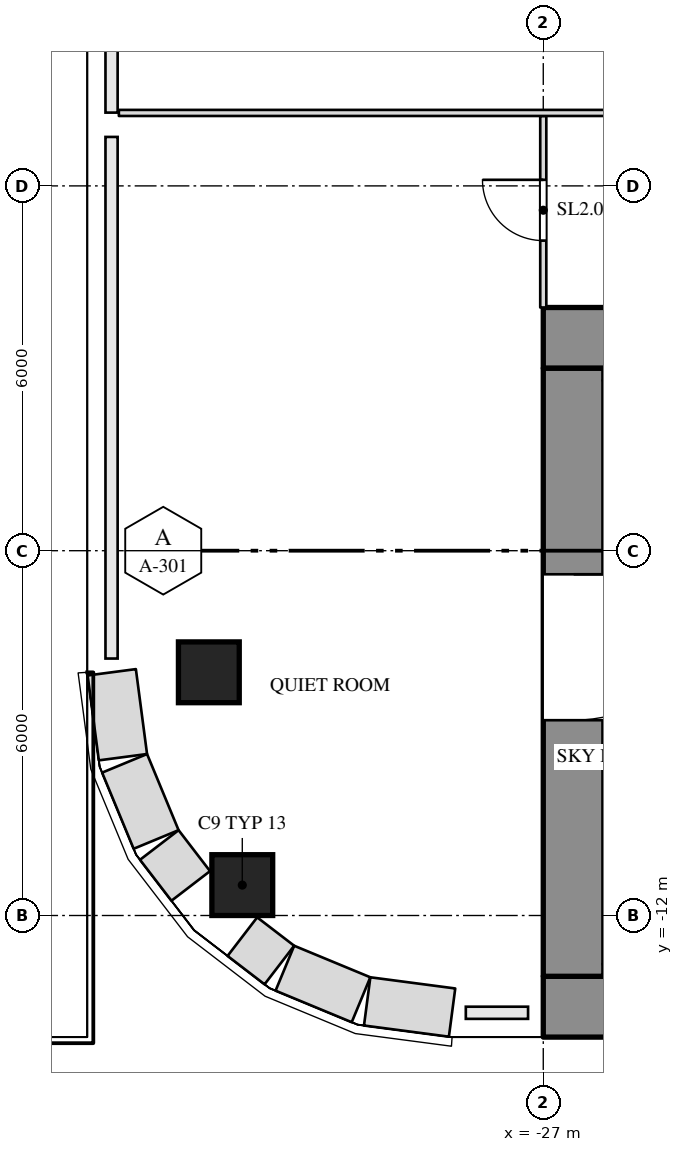
"""IFC4 building model, lengths in metres.
Left out: names, types, materials, properties, quantities, classifications, styles, units other than length and angle.
Written with IfcOpenShell. Run it as: python <this file> out.ifc"""

import sys

from ifc_helpers import new_model, si_unit, direction, frame, frame_2d, origin, origin_2d, place, context, subcontext, project, spatial, rectangle, extrude, element, fill, save


model = new_model("IFC4")
c1 = context("Model", 3, precision=1e-05, world=origin(), true_north=direction((0.0, 1.0)))
c2 = subcontext(c1, "Body", "Model", "MODEL_VIEW")
j1 = project(units=[si_unit("LENGTHUNIT", "METRE"), si_unit("PLANEANGLEUNIT", "RADIAN")], contexts=[c1])
p1 = place(None, origin())
s1 = spatial("IfcSite", under=j1, at=p1, CompositionType="ELEMENT")
p2 = place(p1, origin())
s2 = spatial("IfcBuilding", under=s1, at=p2, CompositionType="ELEMENT")
p3 = place(p2, frame((0.0, 0.0, 156.5)))
s3 = spatial("IfcBuildingStorey", under=s2, at=p3, CompositionType="ELEMENT", Elevation=156.5)
for number, where, z_axis, x_axis in (
    (1, (-31.95, -11.5, 0.0), (0.0, 0.0, 1.0), (1.0, 0.0, 0.0)),
    (2, (-32.5, -8.0, 0.0), (0.0, 0.0, 1.0), (1.0, 0.0, 0.0)),
):
    element("IfcColumn", number, at=place(p3, frame(where, z_axis=z_axis, x_axis=x_axis)), inside=s3, PredefinedType="COLUMN", context=c2, shape_type="SweptSolid", body=[
        extrude(rectangle(XDim=1.0, YDim=1.0, at=origin_2d()), origin(), (0.0, 0.0, 1.0), 4.0),
    ])
p4 = place(p3, frame((-27.0, -2.5, 0.0), z_axis=(0.0, 0.0, 1.0), x_axis=(1.0, 0.0, 0.0)))
e3 = element("IfcWall", 3, at=p4, inside=s3, PredefinedType="SHEAR", context=c2, shape_type="SweptSolid", body=[
    extrude(rectangle(XDim=54.0, YDim=1.0, at=frame_2d((27.0, 0.0))), origin(), (0.0, 0.0, 1.0), 3.65),
])
p5 = place(p4, frame((15.15, 0.0, 0.0)))
e4 = element("IfcOpeningElement", 4, at=p5, cuts=e3, PredefinedType="OPENING", context=c2, shape_type="SweptSolid", body=[
    extrude(rectangle(XDim=2.4, YDim=2.1, at=frame_2d((1.2, 1.05))), frame((0.0, 0.512, 0.0), z_axis=(0.0, -1.0, 0.0), x_axis=(1.0, 0.0, 0.0)), (0.0, 0.0, 1.0), 1.024),
])
p6 = place(p4, frame((36.45, 0.0, 0.0)))
e5 = element("IfcOpeningElement", 5, at=p6, cuts=e3, PredefinedType="OPENING", context=c2, shape_type="SweptSolid", body=[
    extrude(rectangle(XDim=2.4, YDim=2.1, at=frame_2d((1.2, 1.05))), frame((0.0, 0.512, 0.0), z_axis=(0.0, -1.0, 0.0), x_axis=(1.0, 0.0, 0.0)), (0.0, 0.0, 1.0), 1.024),
])
p7 = place(p3, frame((-27.0, -13.5, 0.0), z_axis=(0.0, 0.0, 1.0), x_axis=(1.0, 0.0, 0.0)))
e6 = element("IfcWall", 6, at=p7, inside=s3, PredefinedType="SHEAR", context=c2, shape_type="SweptSolid", body=[
    extrude(rectangle(XDim=54.0, YDim=1.0, at=frame_2d((27.0, 0.0))), origin(), (0.0, 0.0, 1.0), 3.65),
])
p8 = place(p7, frame((16.45, 0.0, 0.0)))
e7 = element("IfcOpeningElement", 7, at=p8, cuts=e6, PredefinedType="OPENING", context=c2, shape_type="SweptSolid", body=[
    extrude(rectangle(XDim=1.0, YDim=2.1, at=frame_2d((0.5, 1.05))), frame((0.0, 0.512, 0.0), z_axis=(0.0, -1.0, 0.0), x_axis=(1.0, 0.0, 0.0)), (0.0, 0.0, 1.0), 1.024),
])
p9 = place(p7, frame((36.55, 0.0, 0.0)))
e8 = element("IfcOpeningElement", 8, at=p9, cuts=e6, PredefinedType="OPENING", context=c2, shape_type="SweptSolid", body=[
    extrude(rectangle(XDim=1.0, YDim=2.1, at=frame_2d((0.5, 1.05))), frame((0.0, 0.512, 0.0), z_axis=(0.0, -1.0, 0.0), x_axis=(1.0, 0.0, 0.0)), (0.0, 0.0, 1.0), 1.024),
])
p10 = place(p3, frame((-26.5, -13.0, 0.0), z_axis=(0.0, 0.0, 1.0), x_axis=(0.0, 1.0, 0.0)))
e9 = element("IfcWall", 9, at=p10, inside=s3, PredefinedType="SHEAR", context=c2, shape_type="SweptSolid", body=[
    extrude(rectangle(XDim=10.0, YDim=1.0, at=frame_2d((5.0, 0.0))), origin(), (0.0, 0.0, 1.0), 3.65),
])
p11 = place(p10, frame((4.212, 0.0, 0.0)))
e10 = element("IfcOpeningElement", 10, at=p11, cuts=e9, PredefinedType="OPENING", context=c2, shape_type="SweptSolid", body=[
    extrude(rectangle(XDim=2.4, YDim=2.1, at=frame_2d((1.2, 1.05))), frame((0.0, 0.512, 0.0), z_axis=(0.0, -1.0, 0.0), x_axis=(1.0, 0.0, 0.0)), (0.0, 0.0, 1.0), 1.024),
])
p12 = place(p3, frame((-27.0, -2.0, 0.0), z_axis=(0.0, 0.0, 1.0), x_axis=(0.0, 1.0, 0.0)))
e11 = element("IfcWall", 11, at=p12, inside=s3, PredefinedType="PARTITIONING", context=c2, shape_type="SweptSolid", body=[
    extrude(rectangle(XDim=3.15, YDim=0.1, at=frame_2d((1.575, 0.0))), origin(), (0.0, 0.0, 1.0), 3.038),
])
p13 = place(p12, frame((1.1, 0.0, 0.0)))
e12 = element("IfcOpeningElement", 12, at=p13, cuts=e11, PredefinedType="OPENING", context=c2, shape_type="SweptSolid", body=[
    extrude(rectangle(XDim=1.0, YDim=2.1, at=frame_2d((0.5, 1.05))), frame((0.0, 0.062, 0.0), z_axis=(0.0, -1.0, 0.0), x_axis=(1.0, 0.0, 0.0)), (0.0, 0.0, 1.0), 0.124),
])
p14 = place(p3, frame((-33.98, 1.2, 0.0), z_axis=(0.0, 0.0, 1.0), x_axis=(1.0, 0.0, 0.0)))
e13 = element("IfcWall", 13, at=p14, inside=s3, PredefinedType="PARTITIONING", context=c2, shape_type="SweptSolid", body=[
    extrude(rectangle(XDim=67.976, YDim=0.1, at=frame_2d((33.988, 0.0))), origin(), (0.0, 0.0, 1.0), 3.65),
])
p15 = place(p14, frame((8.38, 0.0, 0.0)))
e14 = element("IfcOpeningElement", 14, at=p15, cuts=e13, PredefinedType="OPENING", context=c2, shape_type="SweptSolid", body=[
    extrude(rectangle(XDim=1.8, YDim=2.1, at=frame_2d((0.9, 1.05))), frame((0.0, 0.062, 0.0), z_axis=(0.0, -1.0, 0.0), x_axis=(1.0, 0.0, 0.0)), (0.0, 0.0, 1.0), 0.124),
])
p16 = place(p14, frame((15.5, 0.0, 0.0)))
e15 = element("IfcOpeningElement", 15, at=p16, cuts=e13, PredefinedType="OPENING", context=c2, shape_type="SweptSolid", body=[
    extrude(rectangle(XDim=1.0, YDim=2.1, at=frame_2d((0.5, 1.05))), frame((0.0, 0.062, 0.0), z_axis=(0.0, -1.0, 0.0), x_axis=(1.0, 0.0, 0.0)), (0.0, 0.0, 1.0), 0.124),
])
p17 = place(p14, frame((24.01, 0.0, 0.0)))
e16 = element("IfcOpeningElement", 16, at=p17, cuts=e13, PredefinedType="OPENING", context=c2, shape_type="SweptSolid", body=[
    extrude(rectangle(XDim=1.8, YDim=2.1, at=frame_2d((0.9, 1.05))), frame((0.0, 0.062, 0.0), z_axis=(0.0, -1.0, 0.0), x_axis=(1.0, 0.0, 0.0)), (0.0, 0.0, 1.0), 0.124),
])
p18 = place(p14, frame((31.23, 0.0, 0.0)))
e17 = element("IfcOpeningElement", 17, at=p18, cuts=e13, PredefinedType="OPENING", context=c2, shape_type="SweptSolid", body=[
    extrude(rectangle(XDim=1.8, YDim=2.1, at=frame_2d((0.9, 1.05))), frame((0.0, 0.062, 0.0), z_axis=(0.0, -1.0, 0.0), x_axis=(1.0, 0.0, 0.0)), (0.0, 0.0, 1.0), 0.124),
])
p19 = place(p14, frame((44.66, 0.0, 0.0)))
e18 = element("IfcOpeningElement", 18, at=p19, cuts=e13, PredefinedType="OPENING", context=c2, shape_type="SweptSolid", body=[
    extrude(rectangle(XDim=1.8, YDim=2.1, at=frame_2d((0.9, 1.05))), frame((0.0, 0.062, 0.0), z_axis=(0.0, -1.0, 0.0), x_axis=(1.0, 0.0, 0.0)), (0.0, 0.0, 1.0), 0.124),
])
p20 = place(p14, frame((55.93, 0.0, 0.0)))
e19 = element("IfcOpeningElement", 19, at=p20, cuts=e13, PredefinedType="OPENING", context=c2, shape_type="SweptSolid", body=[
    extrude(rectangle(XDim=1.8, YDim=2.1, at=frame_2d((0.9, 1.05))), frame((0.0, 0.062, 0.0), z_axis=(0.0, -1.0, 0.0), x_axis=(1.0, 0.0, 0.0)), (0.0, 0.0, 1.0), 0.124),
])
p21 = place(p3, frame((-34.097, -8.0, 0.0), z_axis=(0.0, 0.0, 1.0), x_axis=(0.130517283865, -0.99144603414, 0.0)))
e20 = element("IfcWall", 20, at=p21, inside=s3, PredefinedType="SOLIDWALL", context=c2, shape_type="SweptSolid", body=[
    extrude(rectangle(XDim=1.408, YDim=0.8, at=frame_2d((0.704, 0.0))), origin(), (0.0, 0.0, 1.0), 3.65),
])
p22 = place(p3, frame((-33.886, -9.497, 0.0), z_axis=(0.0, 0.0, 1.0), x_axis=(0.38276009378, -0.923847774587, 0.0)))
e21 = element("IfcWall", 21, at=p22, inside=s3, PredefinedType="SOLIDWALL", context=c2, shape_type="SweptSolid", body=[
    extrude(rectangle(XDim=1.355, YDim=0.8, at=frame_2d((0.678, 0.0))), origin(), (0.0, 0.0, 1.0), 3.65),
])
p23 = place(p3, frame((-33.315, -10.84, 0.0), z_axis=(0.0, 0.0, 1.0), x_axis=(0.608751445631, -0.793361000707, 0.0)))
e22 = element("IfcWall", 22, at=p23, inside=s3, PredefinedType="SOLIDWALL", context=c2, shape_type="SweptSolid", body=[
    extrude(rectangle(XDim=0.849, YDim=0.8, at=frame_2d((0.425, 0.0))), origin(), (0.0, 0.0, 1.0), 3.65),
])
p24 = place(p3, frame((-31.948, -12.348, 0.0), z_axis=(0.0, 0.0, 1.0), x_axis=(0.793380840338, -0.608725588574, 0.0)))
e23 = element("IfcWall", 23, at=p24, inside=s3, PredefinedType="SOLIDWALL", context=c2, shape_type="SweptSolid", body=[
    extrude(rectangle(XDim=0.767, YDim=0.8, at=frame_2d((0.383, 0.0))), origin(), (0.0, 0.0, 1.0), 3.65),
])
p25 = place(p3, frame((-31.25, -12.867, 0.0), z_axis=(0.0, 0.0, 1.0), x_axis=(0.923847774587, -0.38276009378, 0.0)))
e24 = element("IfcWall", 24, at=p25, inside=s3, PredefinedType="SOLIDWALL", context=c2, shape_type="SweptSolid", body=[
    extrude(rectangle(XDim=1.355, YDim=0.8, at=frame_2d((0.678, 0.0))), origin(), (0.0, 0.0, 1.0), 3.65),
])
p26 = place(p3, frame((-29.896, -13.413, 0.0), z_axis=(0.0, 0.0, 1.0), x_axis=(0.99144603414, -0.130517283865, 0.0)))
e25 = element("IfcWall", 25, at=p26, inside=s3, PredefinedType="SOLIDWALL", context=c2, shape_type="SweptSolid", body=[
    extrude(rectangle(XDim=1.408, YDim=0.8, at=frame_2d((0.704, 0.0))), origin(), (0.0, 0.0, 1.0), 3.65),
])
p27 = place(p13, origin())
e26 = element("IfcDoor", 26, at=p27, inside=s3, OperationType="SINGLE_SWING_RIGHT", PredefinedType="DOOR", context=c2, shape_type="SweptSolid", body=[
    extrude(rectangle(XDim=1.0, YDim=2.1, at=frame_2d((0.5, 1.05))), frame((0.0, 0.025, 0.0), z_axis=(0.0, -1.0, 0.0), x_axis=(1.0, 0.0, 0.0)), (0.0, 0.0, 1.0), 0.05),
])
fill(e12, e26)
p28 = place(p11, origin())
e27 = element("IfcDoor", 27, at=p28, inside=s3, OperationType="DOUBLE_DOOR_SINGLE_SWING", PredefinedType="DOOR", context=c2, shape_type="SweptSolid", body=[
    extrude(rectangle(XDim=2.4, YDim=2.1, at=frame_2d((1.2, 1.05))), frame((0.0, 0.025, 0.0), z_axis=(0.0, -1.0, 0.0), x_axis=(1.0, 0.0, 0.0)), (0.0, 0.0, 1.0), 0.05),
])
fill(e10, e27)
save(model, sys.argv[1])
